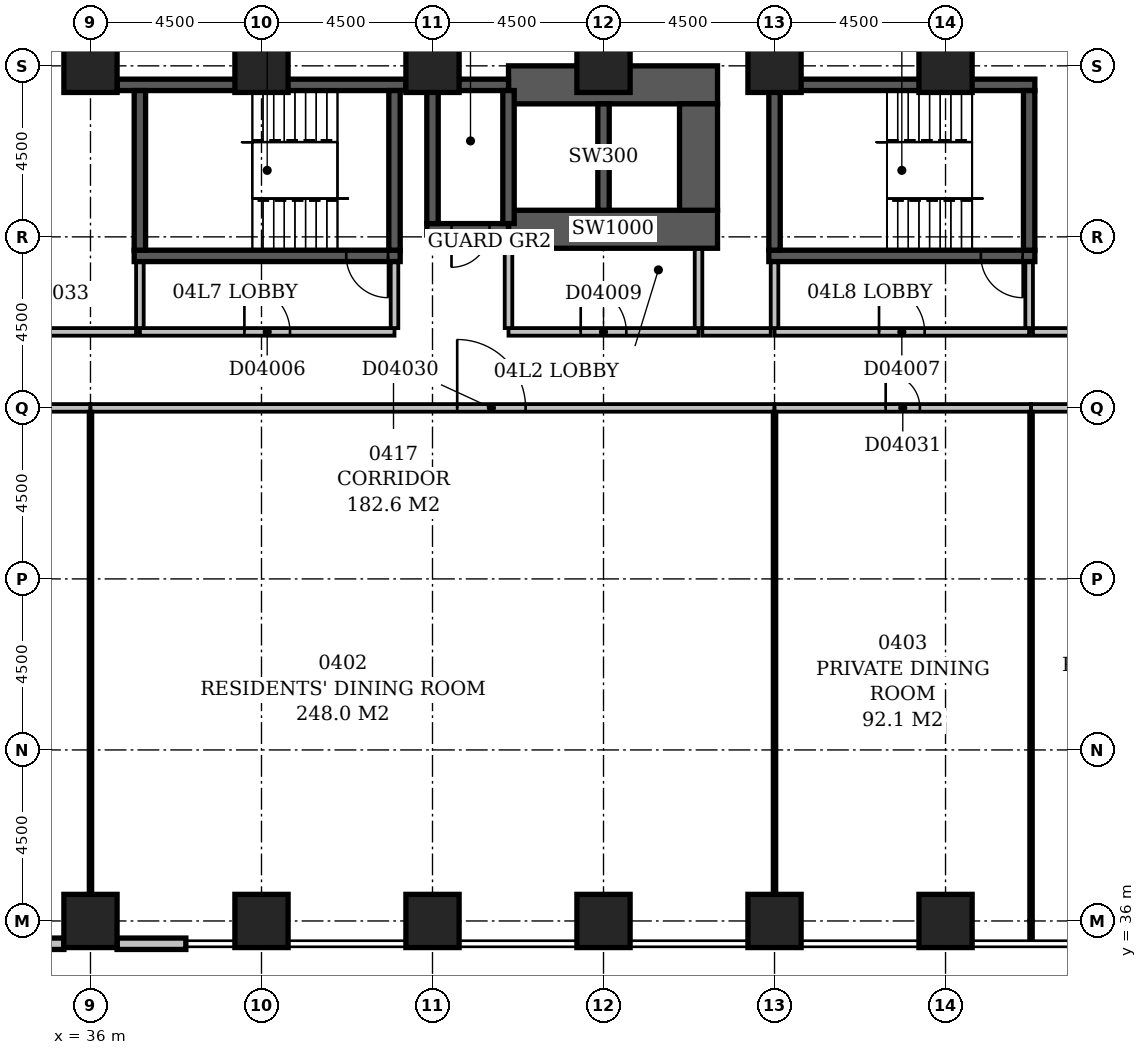
"""IFC4 building model, lengths in metres.
Left out: names, types, materials, properties, quantities, classifications, styles, units other than length and angle.
Written with IfcOpenShell. Run it as: python <this file> out.ifc"""

import sys

from ifc_helpers import new_model, si_unit, direction, frame, frame_2d, origin, origin_2d, place, context, subcontext, project, spatial, rectangle, extrude, element, fill, save


model = new_model("IFC4")
c1 = context("Model", 3, precision=1e-05, world=origin(), true_north=direction((0.0, 1.0)))
c2 = subcontext(c1, "Body", "Model", "MODEL_VIEW")
j1 = project(units=[si_unit("LENGTHUNIT", "METRE"), si_unit("PLANEANGLEUNIT", "RADIAN")], contexts=[c1])
p1 = place(None, origin())
s1 = spatial("IfcSite", under=j1, at=p1, CompositionType="ELEMENT")
p2 = place(p1, origin())
s2 = spatial("IfcBuilding", under=s1, at=p2, CompositionType="ELEMENT")
p3 = place(p2, frame((0.0, 0.0, 24.0)))
s3 = spatial("IfcBuildingStorey", under=s2, at=p3, CompositionType="ELEMENT", Elevation=24.0)
p4 = place(p3, frame((36.7, 58.0, -0.45), z_axis=(0.0, 0.0, 1.0), x_axis=(1.0, 0.0, 0.0)))
e1 = element("IfcWall", 1, at=p4, inside=s3, PredefinedType="SHEAR", context=c2, shape_type="SweptSolid", body=[
    extrude(rectangle(XDim=7.6, YDim=0.3, at=frame_2d((3.8, 0.0))), origin(), (0.0, 0.0, 1.0), 5.15),
])
p5 = place(p3, frame((37.15, 53.5, -0.45), z_axis=(0.0, 0.0, 1.0), x_axis=(1.0, 0.0, 0.0)))
e2 = element("IfcWall", 2, at=p5, inside=s3, PredefinedType="SHEAR", context=c2, shape_type="SweptSolid", body=[
    extrude(rectangle(XDim=7.0, YDim=0.3, at=frame_2d((3.5, 0.0))), origin(), (0.0, 0.0, 1.0), 5.15),
])
p6 = place(p5, frame((5.58, 0.0, 0.45)))
e3 = element("IfcOpeningElement", 3, at=p6, cuts=e2, PredefinedType="OPENING", context=c2, shape_type="SweptSolid", body=[
    extrude(rectangle(XDim=1.1, YDim=2.1, at=frame_2d((0.55, 1.05))), frame((0.0, 0.162, 0.0), z_axis=(0.0, -1.0, 0.0), x_axis=(1.0, 0.0, 0.0)), (0.0, 0.0, 1.0), 0.324),
])
for number, where, z_axis, x_axis in (
    (4, (37.3, 53.65, -0.45), (0.0, 0.0, 1.0), (0.0, 1.0, 0.0)),
    (5, (44.0, 53.65, -0.45), (0.0, 0.0, 1.0), (0.0, 1.0, 0.0)),
):
    element("IfcWall", number, at=place(p3, frame(where, z_axis=z_axis, x_axis=x_axis)), inside=s3, PredefinedType="SHEAR", context=c2, shape_type="SweptSolid", body=[
        extrude(rectangle(XDim=4.2, YDim=0.3, at=frame_2d((2.1, 0.0))), origin(), (0.0, 0.0, 1.0), 5.15),
    ])
p7 = place(p3, frame((44.85, 54.2, -0.45), z_axis=(0.0, 0.0, 1.0), x_axis=(1.0, 0.0, 0.0)))
e6 = element("IfcWall", 6, at=p7, inside=s3, PredefinedType="SHEAR", context=c2, shape_type="SweptSolid", body=[
    extrude(rectangle(XDim=2.15, YDim=0.3, at=frame_2d((1.075, 0.0))), origin(), (0.0, 0.0, 1.0), 5.15),
])
p8 = place(p7, frame((0.65, 0.0, 0.45)))
e7 = element("IfcOpeningElement", 7, at=p8, cuts=e6, PredefinedType="OPENING", context=c2, shape_type="SweptSolid", body=[
    extrude(rectangle(XDim=1.0, YDim=2.1, at=frame_2d((0.5, 1.05))), frame((0.0, 0.162, 0.0), z_axis=(0.0, -1.0, 0.0), x_axis=(1.0, 0.0, 0.0)), (0.0, 0.0, 1.0), 0.324),
])
p9 = place(p3, frame((44.85, 58.0, -0.45), z_axis=(0.0, 0.0, 1.0), x_axis=(1.0, 0.0, 0.0)))
e8 = element("IfcWall", 8, at=p9, inside=s3, PredefinedType="SHEAR", context=c2, shape_type="SweptSolid", body=[
    extrude(rectangle(XDim=2.15, YDim=0.3, at=frame_2d((1.075, 0.0))), origin(), (0.0, 0.0, 1.0), 5.15),
])
p10 = place(p3, frame((45.0, 54.35, -0.45), z_axis=(0.0, 0.0, 1.0), x_axis=(0.0, 1.0, 0.0)))
e9 = element("IfcWall", 9, at=p10, inside=s3, PredefinedType="SHEAR", context=c2, shape_type="SweptSolid", body=[
    extrude(rectangle(XDim=3.5, YDim=0.3, at=frame_2d((1.75, 0.0))), origin(), (0.0, 0.0, 1.0), 5.15),
])
p11 = place(p3, frame((47.0, 54.2, -0.45), z_axis=(0.0, 0.0, 1.0), x_axis=(1.0, 0.0, 0.0)))
e10 = element("IfcWall", 10, at=p11, inside=s3, PredefinedType="SHEAR", context=c2, shape_type="SweptSolid", body=[
    extrude(rectangle(XDim=5.5, YDim=1.0, at=frame_2d((2.75, 0.0))), origin(), (0.0, 0.0, 1.0), 5.15),
])
p12 = place(p3, frame((47.0, 54.35, -0.45), z_axis=(0.0, 0.0, 1.0), x_axis=(0.0, 1.0, 0.0)))
e11 = element("IfcWall", 11, at=p12, inside=s3, PredefinedType="SHEAR", context=c2, shape_type="SweptSolid", body=[
    extrude(rectangle(XDim=3.5, YDim=0.3, at=frame_2d((1.75, 0.0))), origin(), (0.0, 0.0, 1.0), 5.15),
])
p13 = place(p3, frame((47.0, 58.0, -0.45), z_axis=(0.0, 0.0, 1.0), x_axis=(1.0, 0.0, 0.0)))
e12 = element("IfcWall", 12, at=p13, inside=s3, PredefinedType="SHEAR", context=c2, shape_type="SweptSolid", body=[
    extrude(rectangle(XDim=5.5, YDim=1.0, at=frame_2d((2.75, 0.0))), origin(), (0.0, 0.0, 1.0), 5.15),
])
p14 = place(p3, frame((49.5, 54.7, -0.45), z_axis=(0.0, 0.0, 1.0), x_axis=(0.0, 1.0, 0.0)))
e13 = element("IfcWall", 13, at=p14, inside=s3, PredefinedType="SHEAR", context=c2, shape_type="SweptSolid", body=[
    extrude(rectangle(XDim=2.8, YDim=0.3, at=frame_2d((1.4, 0.0))), origin(), (0.0, 0.0, 1.0), 5.15),
])
p15 = place(p3, frame((52.0, 54.7, -0.45), z_axis=(0.0, 0.0, 1.0), x_axis=(0.0, 1.0, 0.0)))
e14 = element("IfcWall", 14, at=p15, inside=s3, PredefinedType="SHEAR", context=c2, shape_type="SweptSolid", body=[
    extrude(rectangle(XDim=2.8, YDim=1.0, at=frame_2d((1.4, 0.0))), origin(), (0.0, 0.0, 1.0), 5.15),
])
p16 = place(p3, frame((53.85, 53.5, -0.45), z_axis=(0.0, 0.0, 1.0), x_axis=(1.0, 0.0, 0.0)))
e15 = element("IfcWall", 15, at=p16, inside=s3, PredefinedType="SHEAR", context=c2, shape_type="SweptSolid", body=[
    extrude(rectangle(XDim=7.0, YDim=0.3, at=frame_2d((3.5, 0.0))), origin(), (0.0, 0.0, 1.0), 5.15),
])
p17 = place(p16, frame((5.58, 0.0, 0.45)))
e16 = element("IfcOpeningElement", 16, at=p17, cuts=e15, PredefinedType="OPENING", context=c2, shape_type="SweptSolid", body=[
    extrude(rectangle(XDim=1.1, YDim=2.1, at=frame_2d((0.55, 1.05))), frame((0.0, 0.162, 0.0), z_axis=(0.0, -1.0, 0.0), x_axis=(1.0, 0.0, 0.0)), (0.0, 0.0, 1.0), 0.324),
])
p18 = place(p3, frame((53.85, 58.0, -0.45), z_axis=(0.0, 0.0, 1.0), x_axis=(1.0, 0.0, 0.0)))
e17 = element("IfcWall", 17, at=p18, inside=s3, PredefinedType="SHEAR", context=c2, shape_type="SweptSolid", body=[
    extrude(rectangle(XDim=7.0, YDim=0.3, at=frame_2d((3.5, 0.0))), origin(), (0.0, 0.0, 1.0), 5.15),
])
for number, where, z_axis, x_axis in (
    (18, (54.0, 53.65, -0.45), (0.0, 0.0, 1.0), (0.0, 1.0, 0.0)),
    (19, (60.7, 53.65, -0.45), (0.0, 0.0, 1.0), (0.0, 1.0, 0.0)),
):
    element("IfcWall", number, at=place(p3, frame(where, z_axis=z_axis, x_axis=x_axis)), inside=s3, PredefinedType="SHEAR", context=c2, shape_type="SweptSolid", body=[
        extrude(rectangle(XDim=4.2, YDim=0.3, at=frame_2d((2.1, 0.0))), origin(), (0.0, 0.0, 1.0), 5.15),
    ])
for number, where, z_axis, x_axis in (
    (20, (36.0, 36.0, -0.45), (0.0, 0.0, 1.0), (1.0, 0.0, 0.0)),
    (21, (40.5, 36.0, -0.45), (0.0, 0.0, 1.0), (1.0, 0.0, 0.0)),
    (22, (45.0, 36.0, -0.45), (0.0, 0.0, 1.0), (1.0, 0.0, 0.0)),
    (23, (49.5, 36.0, -0.45), (0.0, 0.0, 1.0), (1.0, 0.0, 0.0)),
    (24, (54.0, 36.0, -0.45), (0.0, 0.0, 1.0), (1.0, 0.0, 0.0)),
    (25, (58.5, 36.0, -0.45), (0.0, 0.0, 1.0), (1.0, 0.0, 0.0)),
    (26, (36.0, 58.5, -0.45), (0.0, 0.0, 1.0), (1.0, 0.0, 0.0)),
    (27, (40.5, 58.5, -0.45), (0.0, 0.0, 1.0), (1.0, 0.0, 0.0)),
    (28, (45.0, 58.5, -0.45), (0.0, 0.0, 1.0), (1.0, 0.0, 0.0)),
    (29, (49.5, 58.5, -0.45), (0.0, 0.0, 1.0), (1.0, 0.0, 0.0)),
    (30, (54.0, 58.5, -0.45), (0.0, 0.0, 1.0), (1.0, 0.0, 0.0)),
    (31, (58.5, 58.5, -0.45), (0.0, 0.0, 1.0), (1.0, 0.0, 0.0)),
):
    element("IfcColumn", number, at=place(p3, frame(where, z_axis=z_axis, x_axis=x_axis)), inside=s3, PredefinedType="COLUMN", context=c2, shape_type="SweptSolid", body=[
        extrude(rectangle(XDim=1.4, YDim=1.4, at=origin_2d()), origin(), (0.0, 0.0, 1.0), 5.15),
    ])
p19 = place(p3, frame((33.652, 35.4, 0.0), z_axis=(0.0, 0.0, 1.0), x_axis=(1.0, 0.0, 0.0)))
e32 = element("IfcWall", 32, at=p19, inside=s3, PredefinedType="STANDARD", context=c2, shape_type="SweptSolid", body=[
    extrude(rectangle(XDim=1.648, YDim=0.3, at=frame_2d((0.824, 0.0))), origin(), (0.0, 0.0, 1.0), 4.1),
])
p20 = place(p3, frame((36.7, 35.4, 0.0), z_axis=(0.0, 0.0, 1.0), x_axis=(1.0, 0.0, 0.0)))
e33 = element("IfcWall", 33, at=p20, inside=s3, PredefinedType="STANDARD", context=c2, shape_type="SweptSolid", body=[
    extrude(rectangle(XDim=1.809, YDim=0.3, at=frame_2d((0.905, 0.0))), origin(), (0.0, 0.0, 1.0), 4.1),
])
p21 = place(p3, frame((47.0, 51.5, 0.0), z_axis=(0.0, 0.0, 1.0), x_axis=(1.0, 0.0, 0.0)))
e34 = element("IfcWall", 34, at=p21, inside=s3, PredefinedType="PARTITIONING", context=c2, shape_type="SweptSolid", body=[
    extrude(rectangle(XDim=5.0, YDim=0.2, at=frame_2d((2.5, 0.0))), origin(), (0.0, 0.0, 1.0), 4.7),
])
p22 = place(p21, frame((1.9, 0.0, 0.0)))
e35 = element("IfcOpeningElement", 35, at=p22, cuts=e34, PredefinedType="OPENING", context=c2, shape_type="SweptSolid", body=[
    extrude(rectangle(XDim=1.2, YDim=2.1, at=frame_2d((0.6, 1.05))), frame((0.0, 0.112, 0.0), z_axis=(0.0, -1.0, 0.0), x_axis=(1.0, 0.0, 0.0)), (0.0, 0.0, 1.0), 0.224),
])
for number, where, z_axis, x_axis in (
    (36, (52.0, 51.6, 0.0), (0.0, 0.0, 1.0), (0.0, 1.0, 0.0)),
    (37, (47.0, 51.6, 0.0), (0.0, 0.0, 1.0), (0.0, 1.0, 0.0)),
):
    element("IfcWall", number, at=place(p3, frame(where, z_axis=z_axis, x_axis=x_axis)), inside=s3, PredefinedType="PARTITIONING", context=c2, shape_type="SweptSolid", body=[
        extrude(rectangle(XDim=2.08, YDim=0.2, at=frame_2d((1.04, 0.0))), origin(), (0.0, 0.0, 1.0), 4.7),
    ])
p23 = place(p3, frame((37.3, 51.5, 0.0), z_axis=(0.0, 0.0, 1.0), x_axis=(1.0, 0.0, 0.0)))
e38 = element("IfcWall", 38, at=p23, inside=s3, PredefinedType="PARTITIONING", context=c2, shape_type="SweptSolid", body=[
    extrude(rectangle(XDim=6.7, YDim=0.2, at=frame_2d((3.35, 0.0))), origin(), (0.0, 0.0, 1.0), 4.7),
])
p24 = place(p23, frame((2.75, 0.0, 0.0)))
e39 = element("IfcOpeningElement", 39, at=p24, cuts=e38, PredefinedType="OPENING", context=c2, shape_type="SweptSolid", body=[
    extrude(rectangle(XDim=1.2, YDim=2.1, at=frame_2d((0.6, 1.05))), frame((0.0, 0.112, 0.0), z_axis=(0.0, -1.0, 0.0), x_axis=(1.0, 0.0, 0.0)), (0.0, 0.0, 1.0), 0.224),
])
for number, where, z_axis, x_axis in (
    (40, (44.0, 51.6, 0.0), (0.0, 0.0, 1.0), (0.0, 1.0, 0.0)),
    (41, (37.3, 51.6, 0.0), (0.0, 0.0, 1.0), (0.0, 1.0, 0.0)),
):
    element("IfcWall", number, at=place(p3, frame(where, z_axis=z_axis, x_axis=x_axis)), inside=s3, PredefinedType="PARTITIONING", context=c2, shape_type="SweptSolid", body=[
        extrude(rectangle(XDim=1.73, YDim=0.2, at=frame_2d((0.865, 0.0))), origin(), (0.0, 0.0, 1.0), 4.7),
    ])
p25 = place(p3, frame((54.0, 51.5, 0.0), z_axis=(0.0, 0.0, 1.0), x_axis=(1.0, 0.0, 0.0)))
e42 = element("IfcWall", 42, at=p25, inside=s3, PredefinedType="PARTITIONING", context=c2, shape_type="SweptSolid", body=[
    extrude(rectangle(XDim=6.7, YDim=0.2, at=frame_2d((3.35, 0.0))), origin(), (0.0, 0.0, 1.0), 4.7),
])
p26 = place(p25, frame((2.75, 0.0, 0.0)))
e43 = element("IfcOpeningElement", 43, at=p26, cuts=e42, PredefinedType="OPENING", context=c2, shape_type="SweptSolid", body=[
    extrude(rectangle(XDim=1.2, YDim=2.1, at=frame_2d((0.6, 1.05))), frame((0.0, 0.112, 0.0), z_axis=(0.0, -1.0, 0.0), x_axis=(1.0, 0.0, 0.0)), (0.0, 0.0, 1.0), 0.224),
])
p27 = place(p3, frame((60.7, 51.6, 0.0), z_axis=(0.0, 0.0, 1.0), x_axis=(0.0, 1.0, 0.0)))
e44 = element("IfcWall", 44, at=p27, inside=s3, PredefinedType="PARTITIONING", context=c2, shape_type="SweptSolid", body=[
    extrude(rectangle(XDim=1.73, YDim=0.2, at=frame_2d((0.865, 0.0))), origin(), (0.0, 0.0, 1.0), 4.7),
])
p28 = place(p3, frame((54.0, 51.6, 0.0), z_axis=(0.0, 0.0, 1.0), x_axis=(0.0, 1.0, 0.0)))
e45 = element("IfcWall", 45, at=p28, inside=s3, PredefinedType="PARTITIONING", context=c2, shape_type="SweptSolid", body=[
    extrude(rectangle(XDim=1.73, YDim=0.2, at=frame_2d((0.865, 0.0))), origin(), (0.0, 0.0, 1.0), 4.0),
])
p29 = place(p3, frame((60.75, 36.0, 0.0), z_axis=(0.0, 0.0, 1.0), x_axis=(0.0, -1.0, 0.0)))
e46 = element("IfcWall", 46, at=p29, inside=s3, PredefinedType="PARTITIONING", context=c2, shape_type="SweptSolid", body=[
    extrude(rectangle(XDim=0.45, YDim=0.1, at=frame_2d((0.225, 0.0))), origin(), (0.0, 0.0, 1.0), 4.7),
])
p30 = place(p3, frame((22.5, 49.5, 0.0), z_axis=(0.0, 0.0, 1.0), x_axis=(1.0, 0.0, 0.0)))
e47 = element("IfcWall", 47, at=p30, inside=s3, PredefinedType="PARTITIONING", context=c2, shape_type="SweptSolid", body=[
    extrude(rectangle(XDim=13.5, YDim=0.2, at=frame_2d((6.75, 0.0))), origin(), (0.0, 0.0, 1.0), 4.7),
])
p31 = place(p30, frame((5.85, 0.0, 0.0)))
e48 = element("IfcOpeningElement", 48, at=p31, cuts=e47, PredefinedType="OPENING", context=c2, shape_type="SweptSolid", body=[
    extrude(rectangle(XDim=1.8, YDim=2.4, at=frame_2d((0.9, 1.2))), frame((0.0, 0.112, 0.0), z_axis=(0.0, -1.0, 0.0), x_axis=(1.0, 0.0, 0.0)), (0.0, 0.0, 1.0), 0.224),
])
p32 = place(p3, frame((36.0, 49.4, 0.0), z_axis=(0.0, 0.0, 1.0), x_axis=(0.0, -1.0, 0.0)))
e49 = element("IfcWall", 49, at=p32, inside=s3, PredefinedType="PARTITIONING", context=c2, shape_type="SweptSolid", body=[
    extrude(rectangle(XDim=13.4, YDim=0.1, at=frame_2d((6.7, 0.0))), origin(), (0.0, 0.0, 1.0), 3.8),
])
p33 = place(p3, frame((36.0, 49.5, 0.0), z_axis=(0.0, 0.0, 1.0), x_axis=(1.0, 0.0, 0.0)))
e50 = element("IfcWall", 50, at=p33, inside=s3, PredefinedType="PARTITIONING", context=c2, shape_type="SweptSolid", body=[
    extrude(rectangle(XDim=18.0, YDim=0.2, at=frame_2d((9.0, 0.0))), origin(), (0.0, 0.0, 1.0), 4.7),
])
p34 = place(p33, frame((9.65, 0.0, 0.0)))
e51 = element("IfcOpeningElement", 51, at=p34, cuts=e50, PredefinedType="OPENING", context=c2, shape_type="SweptSolid", body=[
    extrude(rectangle(XDim=1.8, YDim=2.4, at=frame_2d((0.9, 1.2))), frame((0.0, 0.112, 0.0), z_axis=(0.0, -1.0, 0.0), x_axis=(1.0, 0.0, 0.0)), (0.0, 0.0, 1.0), 0.224),
])
p35 = place(p3, frame((54.0, 49.4, 0.0), z_axis=(0.0, 0.0, 1.0), x_axis=(0.0, -1.0, 0.0)))
e52 = element("IfcWall", 52, at=p35, inside=s3, PredefinedType="PARTITIONING", context=c2, shape_type="SweptSolid", body=[
    extrude(rectangle(XDim=13.4, YDim=0.1, at=frame_2d((6.7, 0.0))), origin(), (0.0, 0.0, 1.0), 4.0),
])
p36 = place(p3, frame((54.0, 49.5, 0.0), z_axis=(0.0, 0.0, 1.0), x_axis=(1.0, 0.0, 0.0)))
e53 = element("IfcWall", 53, at=p36, inside=s3, PredefinedType="PARTITIONING", context=c2, shape_type="SweptSolid", body=[
    extrude(rectangle(XDim=6.75, YDim=0.2, at=frame_2d((3.375, 0.0))), origin(), (0.0, 0.0, 1.0), 4.7),
])
p37 = place(p36, frame((2.925, 0.0, 0.0)))
e54 = element("IfcOpeningElement", 54, at=p37, cuts=e53, PredefinedType="OPENING", context=c2, shape_type="SweptSolid", body=[
    extrude(rectangle(XDim=0.9, YDim=2.1, at=frame_2d((0.45, 1.05))), frame((0.0, 0.112, 0.0), z_axis=(0.0, -1.0, 0.0), x_axis=(1.0, 0.0, 0.0)), (0.0, 0.0, 1.0), 0.224),
])
p38 = place(p3, frame((60.75, 49.4, 0.0), z_axis=(0.0, 0.0, 1.0), x_axis=(0.0, -1.0, 0.0)))
e55 = element("IfcWall", 55, at=p38, inside=s3, PredefinedType="PARTITIONING", context=c2, shape_type="SweptSolid", body=[
    extrude(rectangle(XDim=13.4, YDim=0.1, at=frame_2d((6.7, 0.0))), origin(), (0.0, 0.0, 1.0), 4.7),
])
p39 = place(p3, frame((60.75, 49.5, 0.0), z_axis=(0.0, 0.0, 1.0), x_axis=(1.0, 0.0, 0.0)))
e56 = element("IfcWall", 56, at=p39, inside=s3, PredefinedType="PARTITIONING", context=c2, shape_type="SweptSolid", body=[
    extrude(rectangle(XDim=6.75, YDim=0.2, at=frame_2d((3.375, 0.0))), origin(), (0.0, 0.0, 1.0), 4.7),
])
p40 = place(p39, frame((2.9, 0.0, 0.0)))
e57 = element("IfcOpeningElement", 57, at=p40, cuts=e56, PredefinedType="OPENING", context=c2, shape_type="SweptSolid", body=[
    extrude(rectangle(XDim=0.9, YDim=2.1, at=frame_2d((0.45, 1.05))), frame((0.0, 0.112, 0.0), z_axis=(0.0, -1.0, 0.0), x_axis=(1.0, 0.0, 0.0)), (0.0, 0.0, 1.0), 0.224),
])
p41 = place(p3, frame((37.2, 51.5, 0.0), z_axis=(0.0, 0.0, 1.0), x_axis=(-1.0, 0.0, 0.0)))
e58 = element("IfcWall", 58, at=p41, inside=s3, PredefinedType="PARTITIONING", context=c2, shape_type="SweptSolid", body=[
    extrude(rectangle(XDim=9.3, YDim=0.2, at=frame_2d((4.65, 0.0))), origin(), (0.0, 0.0, 1.0), 4.7),
])
p42 = place(p41, frame((4.15, 0.0, 0.0)))
e59 = element("IfcOpeningElement", 59, at=p42, cuts=e58, PredefinedType="OPENING", context=c2, shape_type="SweptSolid", body=[
    extrude(rectangle(XDim=1.0, YDim=2.1, at=frame_2d((0.5, 1.05))), frame((0.0, 0.112, 0.0), z_axis=(0.0, -1.0, 0.0), x_axis=(1.0, 0.0, 0.0)), (0.0, 0.0, 1.0), 0.224),
])
p43 = place(p3, frame((53.9, 51.5, 0.0), z_axis=(0.0, 0.0, 1.0), x_axis=(-1.0, 0.0, 0.0)))
e60 = element("IfcWall", 60, at=p43, inside=s3, PredefinedType="PARTITIONING", context=c2, shape_type="SweptSolid", body=[
    extrude(rectangle(XDim=1.8, YDim=0.2, at=frame_2d((0.9, 0.0))), origin(), (0.0, 0.0, 1.0), 4.7),
])
p44 = place(p3, frame((67.5, 51.5, 0.0), z_axis=(0.0, 0.0, 1.0), x_axis=(-1.0, 0.0, 0.0)))
e61 = element("IfcWall", 61, at=p44, inside=s3, PredefinedType="PARTITIONING", context=c2, shape_type="SweptSolid", body=[
    extrude(rectangle(XDim=6.7, YDim=0.2, at=frame_2d((3.35, 0.0))), origin(), (0.0, 0.0, 1.0), 4.7),
])
p45 = place(p44, frame((2.65, 0.0, 0.0)))
e62 = element("IfcOpeningElement", 62, at=p45, cuts=e61, PredefinedType="OPENING", context=c2, shape_type="SweptSolid", body=[
    extrude(rectangle(XDim=1.2, YDim=2.1, at=frame_2d((0.6, 1.05))), frame((0.0, 0.112, 0.0), z_axis=(0.0, -1.0, 0.0), x_axis=(1.0, 0.0, 0.0)), (0.0, 0.0, 1.0), 0.224),
])
p46 = place(p24, origin())
e63 = element("IfcDoor", 63, at=p46, inside=s3, OperationType="SINGLE_SWING_LEFT", PredefinedType="DOOR", context=c2, shape_type="SweptSolid", body=[
    extrude(rectangle(XDim=1.2, YDim=2.1, at=frame_2d((0.6, 1.05))), frame((0.0, 0.025, 0.0), z_axis=(0.0, -1.0, 0.0), x_axis=(1.0, 0.0, 0.0)), (0.0, 0.0, 1.0), 0.05),
])
fill(e39, e63)
p47 = place(p26, origin())
e64 = element("IfcDoor", 64, at=p47, inside=s3, OperationType="SINGLE_SWING_LEFT", PredefinedType="DOOR", context=c2, shape_type="SweptSolid", body=[
    extrude(rectangle(XDim=1.2, YDim=2.1, at=frame_2d((0.6, 1.05))), frame((0.0, 0.025, 0.0), z_axis=(0.0, -1.0, 0.0), x_axis=(1.0, 0.0, 0.0)), (0.0, 0.0, 1.0), 0.05),
])
fill(e43, e64)
p48 = place(p22, origin())
e65 = element("IfcDoor", 65, at=p48, inside=s3, OperationType="SINGLE_SWING_LEFT", PredefinedType="DOOR", context=c2, shape_type="SweptSolid", body=[
    extrude(rectangle(XDim=1.2, YDim=2.1, at=frame_2d((0.6, 1.05))), frame((0.0, 0.025, 0.0), z_axis=(0.0, -1.0, 0.0), x_axis=(1.0, 0.0, 0.0)), (0.0, 0.0, 1.0), 0.05),
])
fill(e35, e65)
p49 = place(p8, frame((1.0, 0.0, 0.0), z_axis=(0.0, 0.0, 1.0), x_axis=(-1.0, 0.0, 0.0)))
e66 = element("IfcDoor", 66, at=p49, inside=s3, OperationType="SINGLE_SWING_RIGHT", PredefinedType="DOOR", context=c2, shape_type="SweptSolid", body=[
    extrude(rectangle(XDim=1.0, YDim=2.1, at=frame_2d((0.5, 1.05))), frame((0.0, 0.025, 0.0), z_axis=(0.0, -1.0, 0.0), x_axis=(1.0, 0.0, 0.0)), (0.0, 0.0, 1.0), 0.05),
])
fill(e7, e66)
p50 = place(p6, origin())
e67 = element("IfcDoor", 67, at=p50, inside=s3, OperationType="SINGLE_SWING_RIGHT", PredefinedType="DOOR", context=c2, shape_type="SweptSolid", body=[
    extrude(rectangle(XDim=1.1, YDim=2.1, at=frame_2d((0.55, 1.05))), frame((0.0, 0.025, 0.0), z_axis=(0.0, -1.0, 0.0), x_axis=(1.0, 0.0, 0.0)), (0.0, 0.0, 1.0), 0.05),
])
fill(e3, e67)
p51 = place(p17, origin())
e68 = element("IfcDoor", 68, at=p51, inside=s3, OperationType="SINGLE_SWING_RIGHT", PredefinedType="DOOR", context=c2, shape_type="SweptSolid", body=[
    extrude(rectangle(XDim=1.1, YDim=2.1, at=frame_2d((0.55, 1.05))), frame((0.0, 0.025, 0.0), z_axis=(0.0, -1.0, 0.0), x_axis=(1.0, 0.0, 0.0)), (0.0, 0.0, 1.0), 0.05),
])
fill(e16, e68)
p52 = place(p34, origin())
e69 = element("IfcDoor", 69, at=p52, inside=s3, OperationType="DOUBLE_DOOR_SINGLE_SWING", PredefinedType="DOOR", context=c2, shape_type="SweptSolid", body=[
    extrude(rectangle(XDim=1.8, YDim=2.4, at=frame_2d((0.9, 1.2))), frame((0.0, 0.025, 0.0), z_axis=(0.0, -1.0, 0.0), x_axis=(1.0, 0.0, 0.0)), (0.0, 0.0, 1.0), 0.05),
])
fill(e51, e69)
p53 = place(p37, origin())
e70 = element("IfcDoor", 70, at=p53, inside=s3, OperationType="SINGLE_SWING_LEFT", PredefinedType="DOOR", context=c2, shape_type="SweptSolid", body=[
    extrude(rectangle(XDim=0.9, YDim=2.1, at=frame_2d((0.45, 1.05))), frame((0.0, 0.025, 0.0), z_axis=(0.0, -1.0, 0.0), x_axis=(1.0, 0.0, 0.0)), (0.0, 0.0, 1.0), 0.05),
])
fill(e54, e70)
save(model, sys.argv[1])
